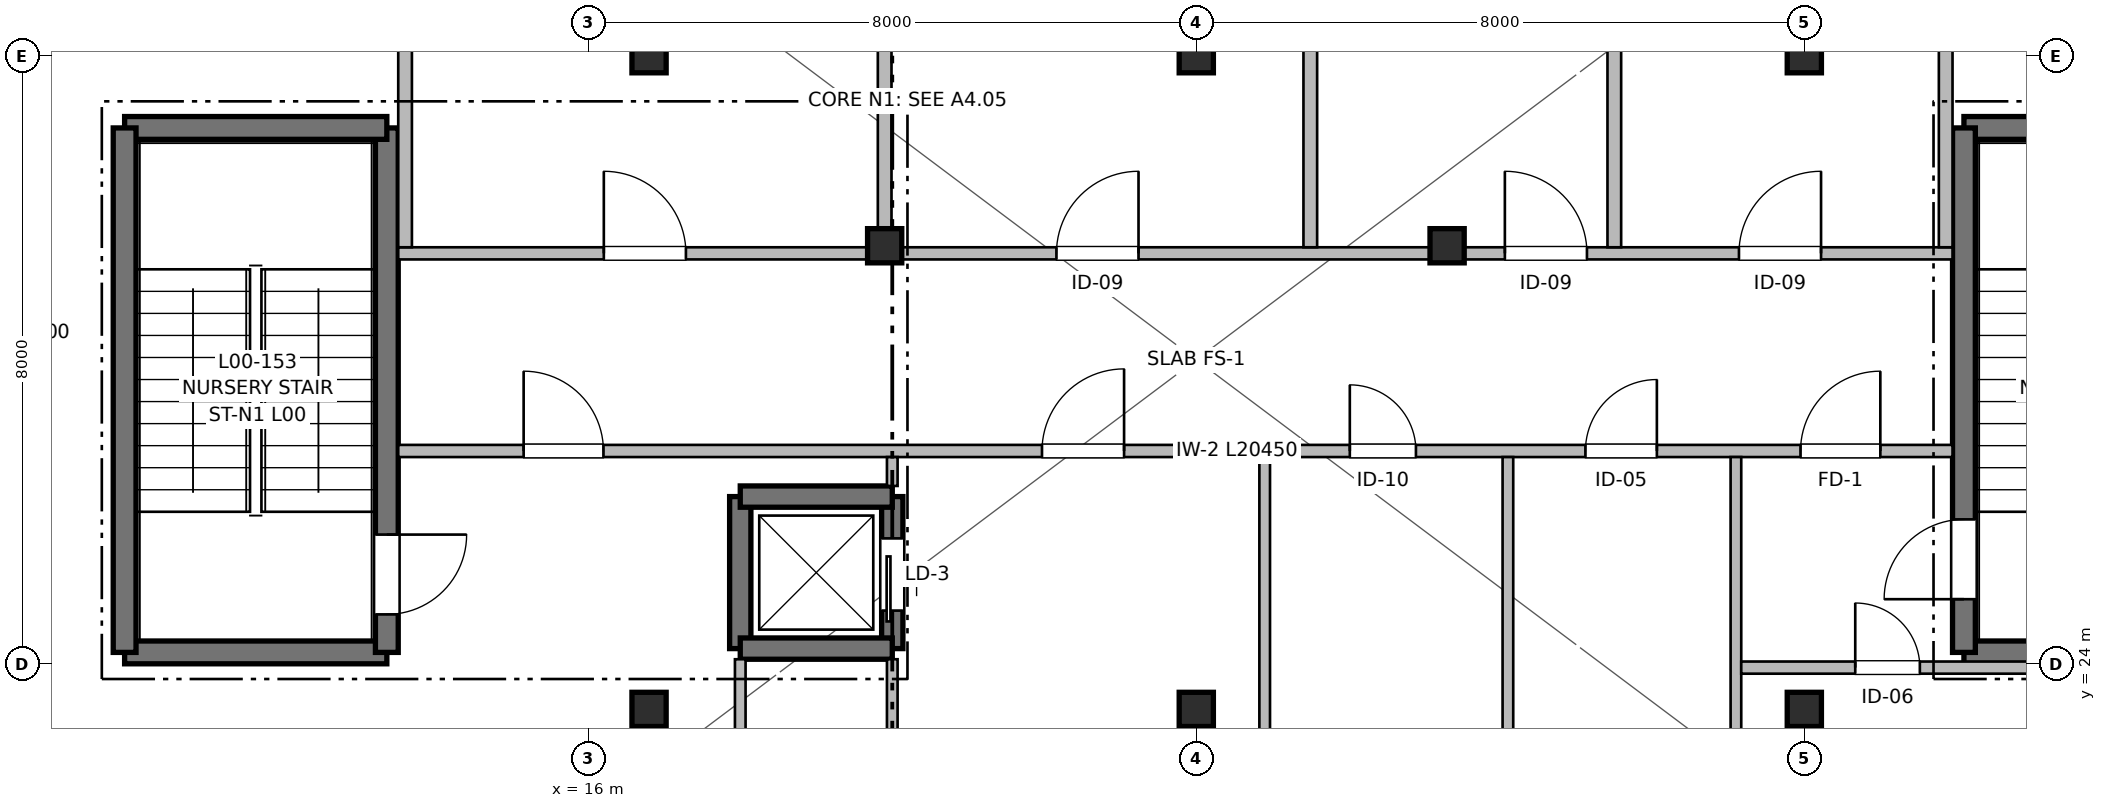
"""IFC4 building model, lengths in metres.
Left out: names, types, materials, properties, quantities, classifications, styles, units other than length and angle.
Written with IfcOpenShell. Run it as: python <this file> out.ifc"""

import sys

from ifc_helpers import new_model, si_unit, direction, frame, frame_2d, origin, origin_2d, place, context, subcontext, project, spatial, rectangle, extrude, element, fill, save


model = new_model("IFC4")
c1 = context("Model", 3, precision=1e-05, world=origin(), true_north=direction((0.0, 1.0)))
c2 = subcontext(c1, "Body", "Model", "MODEL_VIEW")
j1 = project(units=[si_unit("LENGTHUNIT", "METRE"), si_unit("PLANEANGLEUNIT", "RADIAN")], contexts=[c1])
p1 = place(None, origin())
s1 = spatial("IfcSite", under=j1, at=p1, CompositionType="ELEMENT")
p2 = place(p1, origin())
s2 = spatial("IfcBuilding", under=s1, at=p2, CompositionType="ELEMENT")
p3 = place(p2, origin())
s3 = spatial("IfcBuildingStorey", under=s2, at=p3, CompositionType="ELEMENT", Elevation=0.0)
for number, where, z_axis, x_axis in (
    (1, (16.8, 23.4, 0.0), (0.0, 0.0, 1.0), (1.0, 0.0, 0.0)),
    (2, (16.8, 32.0, 0.0), (0.0, 0.0, 1.0), (1.0, 0.0, 0.0)),
    (3, (19.9, 29.5, 0.0), (0.0, 0.0, 1.0), (1.0, 0.0, 0.0)),
    (4, (24.0, 23.4, 0.0), (0.0, 0.0, 1.0), (1.0, 0.0, 0.0)),
    (5, (24.0, 32.0, 0.0), (0.0, 0.0, 1.0), (1.0, 0.0, 0.0)),
    (6, (27.3, 29.5, 0.0), (0.0, 0.0, 1.0), (1.0, 0.0, 0.0)),
    (7, (32.0, 23.4, 0.0), (0.0, 0.0, 1.0), (1.0, 0.0, 0.0)),
    (8, (32.0, 32.0, 0.0), (0.0, 0.0, 1.0), (1.0, 0.0, 0.0)),
):
    element("IfcColumn", number, at=place(p3, frame(where, z_axis=z_axis, x_axis=x_axis)), inside=s3, PredefinedType="COLUMN", context=c2, shape_type="SweptSolid", body=[
        extrude(rectangle(XDim=0.45, YDim=0.45, at=origin_2d()), origin(), (0.0, 0.0, 1.0), 4.16),
    ])
p4 = place(p3, frame((9.9, 24.15, 0.0), z_axis=(0.0, 0.0, 1.0), x_axis=(1.0, 0.0, 0.0)))
e9 = element("IfcWall", 9, at=p4, inside=s3, PredefinedType="SHEAR", context=c2, shape_type="SweptSolid", body=[
    extrude(rectangle(XDim=3.45, YDim=0.3, at=frame_2d((1.725, 0.0))), origin(), (0.0, 0.0, 1.0), 4.16),
])
p5 = place(p3, frame((13.35, 31.05, 0.0), z_axis=(0.0, 0.0, 1.0), x_axis=(0.0, -1.0, 0.0)))
e10 = element("IfcWall", 10, at=p5, inside=s3, PredefinedType="SHEAR", context=c2, shape_type="SweptSolid", body=[
    extrude(rectangle(XDim=6.9, YDim=0.3, at=frame_2d((3.45, 0.0))), origin(), (0.0, 0.0, 1.0), 4.16),
])
p6 = place(p5, frame((5.35, 0.0, 0.0)))
e11 = element("IfcOpeningElement", 11, at=p6, cuts=e10, PredefinedType="OPENING", context=c2, shape_type="SweptSolid", body=[
    extrude(rectangle(XDim=1.05, YDim=2.15, at=frame_2d((0.525, 1.075))), frame((0.0, 0.16, 0.0), z_axis=(0.0, -1.0, 0.0), x_axis=(1.0, 0.0, 0.0)), (0.0, 0.0, 1.0), 0.32),
])
p7 = place(p3, frame((9.9, 31.05, 0.0), z_axis=(0.0, 0.0, 1.0), x_axis=(1.0, 0.0, 0.0)))
e12 = element("IfcWall", 12, at=p7, inside=s3, PredefinedType="SHEAR", context=c2, shape_type="SweptSolid", body=[
    extrude(rectangle(XDim=3.45, YDim=0.3, at=frame_2d((1.725, 0.0))), origin(), (0.0, 0.0, 1.0), 4.16),
])
p8 = place(p3, frame((9.9, 24.15, 0.0), z_axis=(0.0, 0.0, 1.0), x_axis=(0.0, 1.0, 0.0)))
e13 = element("IfcWall", 13, at=p8, inside=s3, PredefinedType="SHEAR", context=c2, shape_type="SweptSolid", body=[
    extrude(rectangle(XDim=6.9, YDim=0.3, at=frame_2d((3.45, 0.0))), origin(), (0.0, 0.0, 1.0), 4.16),
])
for number, where, z_axis, x_axis in (
    (14, (34.1, 24.15, 0.0), (0.0, 0.0, 1.0), (1.0, 0.0, 0.0)),
    (15, (34.1, 31.05, 0.0), (0.0, 0.0, 1.0), (1.0, 0.0, 0.0)),
):
    element("IfcWall", number, at=place(p3, frame(where, z_axis=z_axis, x_axis=x_axis)), inside=s3, PredefinedType="SHEAR", context=c2, shape_type="SweptSolid", body=[
        extrude(rectangle(XDim=3.45, YDim=0.3, at=frame_2d((1.725, 0.0))), origin(), (0.0, 0.0, 1.0), 4.16),
    ])
p9 = place(p3, frame((34.1, 24.15, 0.0), z_axis=(0.0, 0.0, 1.0), x_axis=(0.0, 1.0, 0.0)))
e16 = element("IfcWall", 16, at=p9, inside=s3, PredefinedType="SHEAR", context=c2, shape_type="SweptSolid", body=[
    extrude(rectangle(XDim=6.9, YDim=0.3, at=frame_2d((3.45, 0.0))), origin(), (0.0, 0.0, 1.0), 4.16),
])
p10 = place(p9, frame((0.7, 0.0, 0.0)))
e17 = element("IfcOpeningElement", 17, at=p10, cuts=e16, PredefinedType="OPENING", context=c2, shape_type="SweptSolid", body=[
    extrude(rectangle(XDim=1.05, YDim=2.15, at=frame_2d((0.525, 1.075))), frame((0.0, 0.16, 0.0), z_axis=(0.0, -1.0, 0.0), x_axis=(1.0, 0.0, 0.0)), (0.0, 0.0, 1.0), 0.32),
])
p11 = place(p3, frame((20.0, 24.2, 0.0), z_axis=(0.0, 0.0, 1.0), x_axis=(0.0, 1.0, 0.0)))
e18 = element("IfcWall", 18, at=p11, inside=s3, PredefinedType="SHEAR", context=c2, shape_type="SweptSolid", body=[
    extrude(rectangle(XDim=2.0, YDim=0.28, at=frame_2d((1.0, 0.0))), origin(), (0.0, 0.0, 1.0), 3.9),
])
p12 = place(p11, frame((0.5, 0.0, 0.0)))
e19 = element("IfcOpeningElement", 19, at=p12, cuts=e18, PredefinedType="OPENING", context=c2, shape_type="SweptSolid", body=[
    extrude(rectangle(XDim=0.95, YDim=2.15, at=frame_2d((0.475, 1.075))), frame((0.0, 0.15, 0.0), z_axis=(0.0, -1.0, 0.0), x_axis=(1.0, 0.0, 0.0)), (0.0, 0.0, 1.0), 0.3),
])
for number, where, z_axis, x_axis in (
    (20, (18.0, 24.2, 0.0), (0.0, 0.0, 1.0), (0.0, 1.0, 0.0)),
    (21, (18.0, 24.2, 0.0), (0.0, 0.0, 1.0), (1.0, 0.0, 0.0)),
    (22, (18.0, 26.2, 0.0), (0.0, 0.0, 1.0), (1.0, 0.0, 0.0)),
):
    element("IfcWall", number, at=place(p3, frame(where, z_axis=z_axis, x_axis=x_axis)), inside=s3, PredefinedType="SHEAR", context=c2, shape_type="SweptSolid", body=[
        extrude(rectangle(XDim=2.0, YDim=0.28, at=frame_2d((1.0, 0.0))), origin(), (0.0, 0.0, 1.0), 3.9),
    ])
p13 = place(p3, frame((13.5, 26.8, 0.0), z_axis=(0.0, 0.0, 1.0), x_axis=(1.0, 0.0, 0.0)))
e23 = element("IfcWall", 23, at=p13, inside=s3, PredefinedType="PARTITIONING", context=c2, shape_type="SweptSolid", body=[
    extrude(rectangle(XDim=20.45, YDim=0.16, at=frame_2d((10.225, 0.0))), origin(), (0.0, 0.0, 1.0), 3.89),
])
p14 = place(p13, frame((1.65, 0.0, 0.0)))
e24 = element("IfcOpeningElement", 24, at=p14, cuts=e23, PredefinedType="OPENING", context=c2, shape_type="SweptSolid", body=[
    extrude(rectangle(XDim=1.05, YDim=2.15, at=frame_2d((0.525, 1.075))), frame((0.0, 0.09, 0.0), z_axis=(0.0, -1.0, 0.0), x_axis=(1.0, 0.0, 0.0)), (0.0, 0.0, 1.0), 0.18),
])
p15 = place(p13, frame((18.45, 0.0, 0.0)))
e25 = element("IfcOpeningElement", 25, at=p15, cuts=e23, PredefinedType="OPENING", context=c2, shape_type="SweptSolid", body=[
    extrude(rectangle(XDim=1.05, YDim=2.15, at=frame_2d((0.525, 1.075))), frame((0.0, 0.09, 0.0), z_axis=(0.0, -1.0, 0.0), x_axis=(1.0, 0.0, 0.0)), (0.0, 0.0, 1.0), 0.18),
])
p16 = place(p13, frame((8.47, 0.0, 0.0)))
e26 = element("IfcOpeningElement", 26, at=p16, cuts=e23, PredefinedType="OPENING", context=c2, shape_type="SweptSolid", body=[
    extrude(rectangle(XDim=1.08, YDim=2.15, at=frame_2d((0.54, 1.075))), frame((0.0, 0.09, 0.0), z_axis=(0.0, -1.0, 0.0), x_axis=(1.0, 0.0, 0.0)), (0.0, 0.0, 1.0), 0.18),
])
p17 = place(p13, frame((12.52, 0.0, 0.0)))
e27 = element("IfcOpeningElement", 27, at=p17, cuts=e23, PredefinedType="OPENING", context=c2, shape_type="SweptSolid", body=[
    extrude(rectangle(XDim=0.87, YDim=2.05, at=frame_2d((0.435, 1.025))), frame((0.0, 0.09, 0.0), z_axis=(0.0, -1.0, 0.0), x_axis=(1.0, 0.0, 0.0)), (0.0, 0.0, 1.0), 0.18),
])
p18 = place(p13, frame((15.62, 0.0, 0.0)))
e28 = element("IfcOpeningElement", 28, at=p18, cuts=e23, PredefinedType="OPENING", context=c2, shape_type="SweptSolid", body=[
    extrude(rectangle(XDim=0.94, YDim=2.1, at=frame_2d((0.47, 1.05))), frame((0.0, 0.09, 0.0), z_axis=(0.0, -1.0, 0.0), x_axis=(1.0, 0.0, 0.0)), (0.0, 0.0, 1.0), 0.18),
])
p19 = place(p3, frame((13.5, 29.4, 0.0), z_axis=(0.0, 0.0, 1.0), x_axis=(1.0, 0.0, 0.0)))
e29 = element("IfcWall", 29, at=p19, inside=s3, PredefinedType="PARTITIONING", context=c2, shape_type="SweptSolid", body=[
    extrude(rectangle(XDim=20.45, YDim=0.16, at=frame_2d((10.225, 0.0))), origin(), (0.0, 0.0, 1.0), 3.89),
])
p20 = place(p19, frame((2.705, 0.0, 0.0)))
e30 = element("IfcOpeningElement", 30, at=p20, cuts=e29, PredefinedType="OPENING", context=c2, shape_type="SweptSolid", body=[
    extrude(rectangle(XDim=1.08, YDim=2.15, at=frame_2d((0.54, 1.075))), frame((0.0, 0.09, 0.0), z_axis=(0.0, -1.0, 0.0), x_axis=(1.0, 0.0, 0.0)), (0.0, 0.0, 1.0), 0.18),
])
p21 = place(p19, frame((8.66, 0.0, 0.0)))
e31 = element("IfcOpeningElement", 31, at=p21, cuts=e29, PredefinedType="OPENING", context=c2, shape_type="SweptSolid", body=[
    extrude(rectangle(XDim=1.08, YDim=2.15, at=frame_2d((0.54, 1.075))), frame((0.0, 0.09, 0.0), z_axis=(0.0, -1.0, 0.0), x_axis=(1.0, 0.0, 0.0)), (0.0, 0.0, 1.0), 0.18),
])
p22 = place(p19, frame((14.56, 0.0, 0.0)))
e32 = element("IfcOpeningElement", 32, at=p22, cuts=e29, PredefinedType="OPENING", context=c2, shape_type="SweptSolid", body=[
    extrude(rectangle(XDim=1.08, YDim=2.15, at=frame_2d((0.54, 1.075))), frame((0.0, 0.09, 0.0), z_axis=(0.0, -1.0, 0.0), x_axis=(1.0, 0.0, 0.0)), (0.0, 0.0, 1.0), 0.18),
])
p23 = place(p19, frame((17.64, 0.0, 0.0)))
e33 = element("IfcOpeningElement", 33, at=p23, cuts=e29, PredefinedType="OPENING", context=c2, shape_type="SweptSolid", body=[
    extrude(rectangle(XDim=1.08, YDim=2.15, at=frame_2d((0.54, 1.075))), frame((0.0, 0.09, 0.0), z_axis=(0.0, -1.0, 0.0), x_axis=(1.0, 0.0, 0.0)), (0.0, 0.0, 1.0), 0.18),
])
p24 = place(p3, frame((18.0, 16.2, 0.0), z_axis=(0.0, 0.0, 1.0), x_axis=(0.0, 1.0, 0.0)))
e34 = element("IfcWall", 34, at=p24, inside=s3, PredefinedType="PARTITIONING", context=c2, shape_type="SweptSolid", body=[
    extrude(rectangle(XDim=7.86, YDim=0.14, at=frame_2d((3.93, 0.0))), origin(), (0.0, 0.0, 1.0), 3.89),
])
p25 = place(p24, frame((5.55, 0.0, 0.0)))
e35 = element("IfcOpeningElement", 35, at=p25, cuts=e34, PredefinedType="OPENING", context=c2, shape_type="SweptSolid", body=[
    extrude(rectangle(XDim=0.91, YDim=2.1, at=frame_2d((0.455, 1.05))), frame((0.0, 0.08, 0.0), z_axis=(0.0, -1.0, 0.0), x_axis=(1.0, 0.0, 0.0)), (0.0, 0.0, 1.0), 0.16),
])
p26 = place(p3, frame((20.0, 16.2, 0.0), z_axis=(0.0, 0.0, 1.0), x_axis=(0.0, 1.0, 0.0)))
e36 = element("IfcWall", 36, at=p26, inside=s3, PredefinedType="PARTITIONING", context=c2, shape_type="SweptSolid", body=[
    extrude(rectangle(XDim=7.86, YDim=0.14, at=frame_2d((3.93, 0.0))), origin(), (0.0, 0.0, 1.0), 3.89),
])
p27 = place(p3, frame((20.0, 26.34, 0.0), z_axis=(0.0, 0.0, 1.0), x_axis=(0.0, 1.0, 0.0)))
e37 = element("IfcWall", 37, at=p27, inside=s3, PredefinedType="PARTITIONING", context=c2, shape_type="SweptSolid", body=[
    extrude(rectangle(XDim=0.38, YDim=0.14, at=frame_2d((0.19, 0.0))), origin(), (0.0, 0.0, 1.0), 3.89),
])
p28 = place(p3, frame((31.1, 16.2, 0.0), z_axis=(0.0, 0.0, 1.0), x_axis=(0.0, 1.0, 0.0)))
e38 = element("IfcWall", 38, at=p28, inside=s3, PredefinedType="PARTITIONING", context=c2, shape_type="SweptSolid", body=[
    extrude(rectangle(XDim=10.52, YDim=0.14, at=frame_2d((5.26, 0.0))), origin(), (0.0, 0.0, 1.0), 3.89),
])
for number, where, z_axis, x_axis in (
    (39, (13.59, 29.48, 0.0), (0.0, 0.0, 1.0), (0.0, 1.0, 0.0)),
    (40, (19.9, 29.48, 0.0), (0.0, 0.0, 1.0), (0.0, 1.0, 0.0)),
    (41, (25.5, 29.48, 0.0), (0.0, 0.0, 1.0), (0.0, 1.0, 0.0)),
):
    element("IfcWall", number, at=place(p3, frame(where, z_axis=z_axis, x_axis=x_axis)), inside=s3, PredefinedType="PARTITIONING", context=c2, shape_type="SweptSolid", body=[
        extrude(rectangle(XDim=10.32, YDim=0.18, at=frame_2d((5.16, 0.0))), origin(), (0.0, 0.0, 1.0), 3.89),
    ])
p29 = place(p3, frame((29.5, 29.48, 0.0), z_axis=(0.0, 0.0, 1.0), x_axis=(0.0, 1.0, 0.0)))
e42 = element("IfcWall", 42, at=p29, inside=s3, PredefinedType="PARTITIONING", context=c2, shape_type="SweptSolid", body=[
    extrude(rectangle(XDim=10.32, YDim=0.18, at=frame_2d((5.16, 0.0))), origin(), (0.0, 0.0, 1.0), 3.89),
])
p30 = place(p29, frame((3.5, 0.0, 1.05)))
e43 = element("IfcOpeningElement", 43, at=p30, cuts=e42, PredefinedType="OPENING", context=c2, shape_type="SweptSolid", body=[
    extrude(rectangle(XDim=1.4, YDim=1.1, at=frame_2d((0.7, 0.55))), frame((0.0, 0.1, 0.0), z_axis=(0.0, -1.0, 0.0), x_axis=(1.0, 0.0, 0.0)), (0.0, 0.0, 1.0), 0.2),
])
p31 = place(p3, frame((33.86, 29.48, 0.0), z_axis=(0.0, 0.0, 1.0), x_axis=(0.0, 1.0, 0.0)))
e44 = element("IfcWall", 44, at=p31, inside=s3, PredefinedType="PARTITIONING", context=c2, shape_type="SweptSolid", body=[
    extrude(rectangle(XDim=10.32, YDim=0.18, at=frame_2d((5.16, 0.0))), origin(), (0.0, 0.0, 1.0), 3.89),
])
p32 = place(p3, frame((31.17, 23.95, 0.0), z_axis=(0.0, 0.0, 1.0), x_axis=(1.0, 0.0, 0.0)))
e45 = element("IfcWall", 45, at=p32, inside=s3, PredefinedType="PARTITIONING", context=c2, shape_type="SweptSolid", body=[
    extrude(rectangle(XDim=8.67, YDim=0.16, at=frame_2d((4.335, 0.0))), origin(), (0.0, 0.0, 1.0), 3.89),
])
p33 = place(p32, frame((1.5, 0.0, 0.0)))
e46 = element("IfcOpeningElement", 46, at=p33, cuts=e45, PredefinedType="OPENING", context=c2, shape_type="SweptSolid", body=[
    extrude(rectangle(XDim=0.85, YDim=2.05, at=frame_2d((0.425, 1.025))), frame((0.0, 0.09, 0.0), z_axis=(0.0, -1.0, 0.0), x_axis=(1.0, 0.0, 0.0)), (0.0, 0.0, 1.0), 0.18),
])
for number, where, z_axis, x_axis in (
    (47, (24.9, 16.2, 0.0), (0.0, 0.0, 1.0), (0.0, 1.0, 0.0)),
    (48, (28.1, 16.2, 0.0), (0.0, 0.0, 1.0), (0.0, 1.0, 0.0)),
):
    element("IfcWall", number, at=place(p3, frame(where, z_axis=z_axis, x_axis=x_axis)), inside=s3, PredefinedType="PARTITIONING", context=c2, shape_type="SweptSolid", body=[
        extrude(rectangle(XDim=10.52, YDim=0.14, at=frame_2d((5.26, 0.0))), origin(), (0.0, 0.0, 1.0), 3.89),
    ])
p34 = place(p6, origin())
e49 = element("IfcDoor", 49, at=p34, inside=s3, OperationType="SINGLE_SWING_LEFT", PredefinedType="DOOR", context=c2, shape_type="SweptSolid", body=[
    extrude(rectangle(XDim=1.05, YDim=2.15, at=frame_2d((0.525, 1.075))), frame((0.0, 0.025, 0.0), z_axis=(0.0, -1.0, 0.0), x_axis=(1.0, 0.0, 0.0)), (0.0, 0.0, 1.0), 0.05),
])
fill(e11, e49)
p35 = place(p10, origin())
e50 = element("IfcDoor", 50, at=p35, inside=s3, OperationType="SINGLE_SWING_LEFT", PredefinedType="DOOR", context=c2, shape_type="SweptSolid", body=[
    extrude(rectangle(XDim=1.05, YDim=2.15, at=frame_2d((0.525, 1.075))), frame((0.0, 0.025, 0.0), z_axis=(0.0, -1.0, 0.0), x_axis=(1.0, 0.0, 0.0)), (0.0, 0.0, 1.0), 0.05),
])
fill(e17, e50)
p36 = place(p12, origin())
e51 = element("IfcDoor", 51, at=p36, inside=s3, OperationType="SLIDING_TO_LEFT", PredefinedType="DOOR", context=c2, shape_type="SweptSolid", body=[
    extrude(rectangle(XDim=0.95, YDim=2.15, at=frame_2d((0.475, 1.075))), frame((0.0, 0.025, 0.0), z_axis=(0.0, -1.0, 0.0), x_axis=(1.0, 0.0, 0.0)), (0.0, 0.0, 1.0), 0.05),
])
fill(e19, e51)
p37 = place(p14, origin())
e52 = element("IfcDoor", 52, at=p37, inside=s3, OperationType="SINGLE_SWING_LEFT", PredefinedType="DOOR", context=c2, shape_type="SweptSolid", body=[
    extrude(rectangle(XDim=1.05, YDim=2.15, at=frame_2d((0.525, 1.075))), frame((0.0, 0.025, 0.0), z_axis=(0.0, -1.0, 0.0), x_axis=(1.0, 0.0, 0.0)), (0.0, 0.0, 1.0), 0.05),
])
fill(e24, e52)
p38 = place(p15, origin())
e53 = element("IfcDoor", 53, at=p38, inside=s3, OperationType="SINGLE_SWING_RIGHT", PredefinedType="DOOR", context=c2, shape_type="SweptSolid", body=[
    extrude(rectangle(XDim=1.05, YDim=2.15, at=frame_2d((0.525, 1.075))), frame((0.0, 0.025, 0.0), z_axis=(0.0, -1.0, 0.0), x_axis=(1.0, 0.0, 0.0)), (0.0, 0.0, 1.0), 0.05),
])
fill(e25, e53)
p39 = place(p20, origin())
e54 = element("IfcDoor", 54, at=p39, inside=s3, OperationType="SINGLE_SWING_LEFT", PredefinedType="DOOR", context=c2, shape_type="SweptSolid", body=[
    extrude(rectangle(XDim=1.08, YDim=2.15, at=frame_2d((0.54, 1.075))), frame((0.0, 0.025, 0.0), z_axis=(0.0, -1.0, 0.0), x_axis=(1.0, 0.0, 0.0)), (0.0, 0.0, 1.0), 0.05),
])
fill(e30, e54)
p40 = place(p21, origin())
e55 = element("IfcDoor", 55, at=p40, inside=s3, OperationType="SINGLE_SWING_RIGHT", PredefinedType="DOOR", context=c2, shape_type="SweptSolid", body=[
    extrude(rectangle(XDim=1.08, YDim=2.15, at=frame_2d((0.54, 1.075))), frame((0.0, 0.025, 0.0), z_axis=(0.0, -1.0, 0.0), x_axis=(1.0, 0.0, 0.0)), (0.0, 0.0, 1.0), 0.05),
])
fill(e31, e55)
p41 = place(p22, origin())
e56 = element("IfcDoor", 56, at=p41, inside=s3, OperationType="SINGLE_SWING_LEFT", PredefinedType="DOOR", context=c2, shape_type="SweptSolid", body=[
    extrude(rectangle(XDim=1.08, YDim=2.15, at=frame_2d((0.54, 1.075))), frame((0.0, 0.025, 0.0), z_axis=(0.0, -1.0, 0.0), x_axis=(1.0, 0.0, 0.0)), (0.0, 0.0, 1.0), 0.05),
])
fill(e32, e56)
p42 = place(p23, origin())
e57 = element("IfcDoor", 57, at=p42, inside=s3, OperationType="SINGLE_SWING_RIGHT", PredefinedType="DOOR", context=c2, shape_type="SweptSolid", body=[
    extrude(rectangle(XDim=1.08, YDim=2.15, at=frame_2d((0.54, 1.075))), frame((0.0, 0.025, 0.0), z_axis=(0.0, -1.0, 0.0), x_axis=(1.0, 0.0, 0.0)), (0.0, 0.0, 1.0), 0.05),
])
fill(e33, e57)
p43 = place(p33, origin())
e58 = element("IfcDoor", 58, at=p43, inside=s3, OperationType="SINGLE_SWING_LEFT", PredefinedType="DOOR", context=c2, shape_type="SweptSolid", body=[
    extrude(rectangle(XDim=0.85, YDim=2.05, at=frame_2d((0.425, 1.025))), frame((0.0, 0.025, 0.0), z_axis=(0.0, -1.0, 0.0), x_axis=(1.0, 0.0, 0.0)), (0.0, 0.0, 1.0), 0.05),
])
fill(e46, e58)
p44 = place(p16, origin())
e59 = element("IfcDoor", 59, at=p44, inside=s3, OperationType="SINGLE_SWING_RIGHT", PredefinedType="DOOR", context=c2, shape_type="SweptSolid", body=[
    extrude(rectangle(XDim=1.08, YDim=2.15, at=frame_2d((0.54, 1.075))), frame((0.0, 0.025, 0.0), z_axis=(0.0, -1.0, 0.0), x_axis=(1.0, 0.0, 0.0)), (0.0, 0.0, 1.0), 0.05),
])
fill(e26, e59)
p45 = place(p17, origin())
e60 = element("IfcDoor", 60, at=p45, inside=s3, OperationType="SINGLE_SWING_LEFT", PredefinedType="DOOR", context=c2, shape_type="SweptSolid", body=[
    extrude(rectangle(XDim=0.87, YDim=2.05, at=frame_2d((0.435, 1.025))), frame((0.0, 0.025, 0.0), z_axis=(0.0, -1.0, 0.0), x_axis=(1.0, 0.0, 0.0)), (0.0, 0.0, 1.0), 0.05),
])
fill(e27, e60)
p46 = place(p18, origin())
e61 = element("IfcDoor", 61, at=p46, inside=s3, OperationType="SINGLE_SWING_RIGHT", PredefinedType="DOOR", context=c2, shape_type="SweptSolid", body=[
    extrude(rectangle(XDim=0.94, YDim=2.1, at=frame_2d((0.47, 1.05))), frame((0.0, 0.025, 0.0), z_axis=(0.0, -1.0, 0.0), x_axis=(1.0, 0.0, 0.0)), (0.0, 0.0, 1.0), 0.05),
])
fill(e28, e61)
save(model, sys.argv[1])
